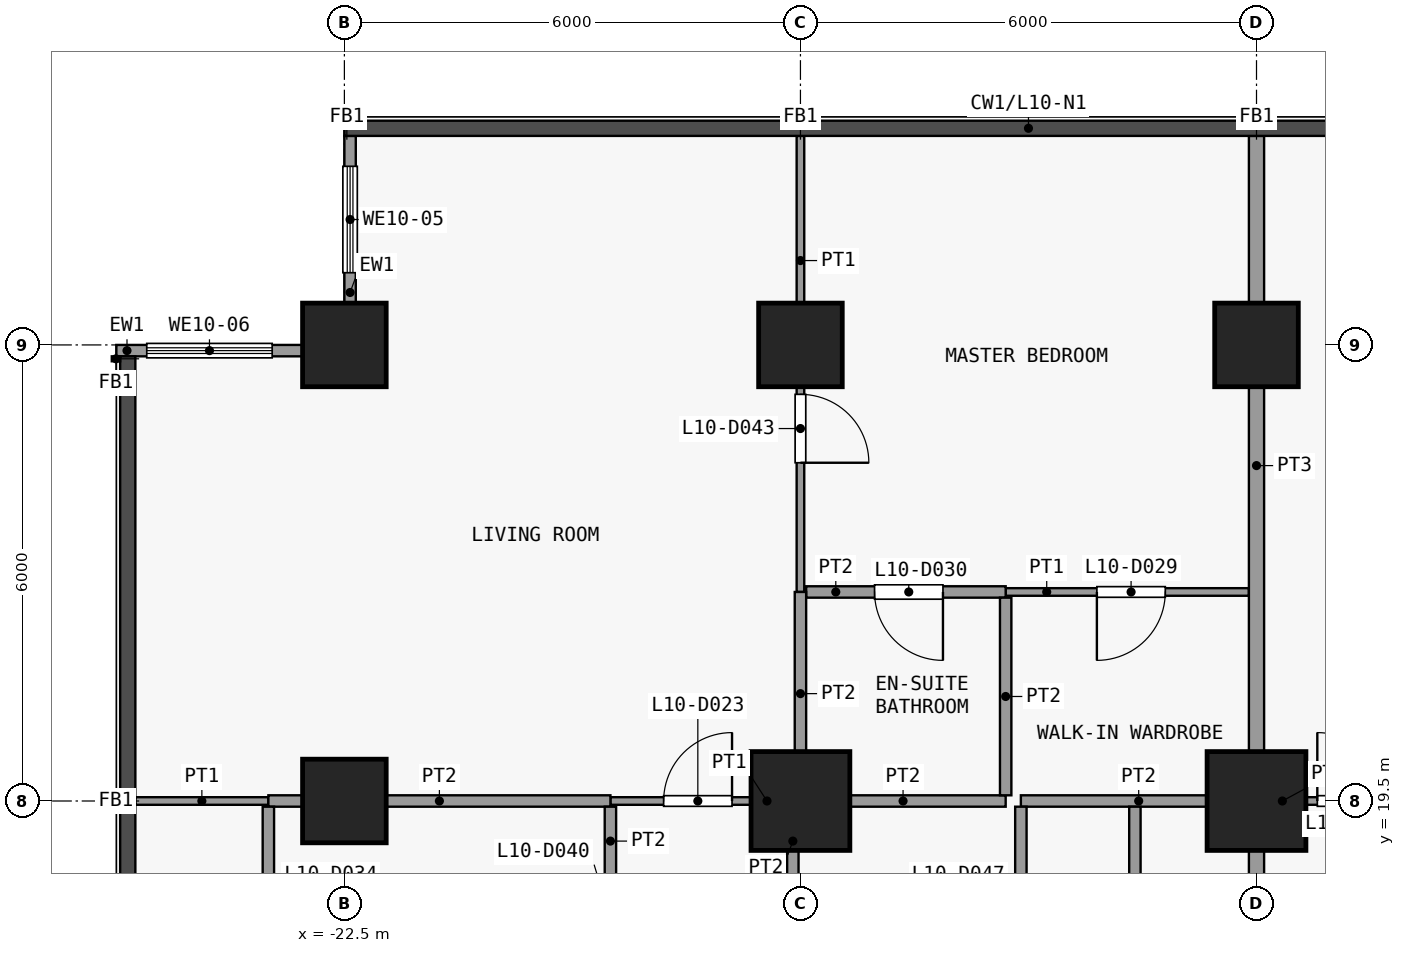
"""IFC4 building model, lengths in metres.
Left out: names, types, materials, properties, quantities, classifications, styles, units other than length and angle.
Written with IfcOpenShell. Run it as: python <this file> out.ifc"""

import sys

from ifc_helpers import new_model, si_unit, direction, frame, frame_2d, origin, origin_2d, place, context, subcontext, project, spatial, rectangle, extrude, element, fill, save


model = new_model("IFC4")
c1 = context("Model", 3, precision=1e-05, world=origin(), true_north=direction((0.0, 1.0)))
c2 = subcontext(c1, "Body", "Model", "MODEL_VIEW")
j1 = project(units=[si_unit("LENGTHUNIT", "METRE"), si_unit("PLANEANGLEUNIT", "RADIAN")], contexts=[c1])
p1 = place(None, origin())
s1 = spatial("IfcSite", under=j1, at=p1, CompositionType="ELEMENT")
p2 = place(p1, origin())
s2 = spatial("IfcBuilding", under=s1, at=p2, CompositionType="ELEMENT")
p3 = place(p2, frame((0.0, 0.0, 46.9)))
s3 = spatial("IfcBuildingStorey", under=s2, at=p3, CompositionType="ELEMENT", Elevation=46.9)
for number, where, z_axis, x_axis in (
    (1, (-22.5, 19.5, 0.0), (0.0, 0.0, 1.0), (1.0, 0.0, 0.0)),
    (2, (-22.5, 25.5, 0.0), (0.0, 0.0, 1.0), (1.0, 0.0, 0.0)),
):
    element("IfcColumn", number, at=place(p3, frame(where, z_axis=z_axis, x_axis=x_axis)), inside=s3, PredefinedType="COLUMN", context=c2, shape_type="SweptSolid", body=[
        extrude(rectangle(XDim=1.1, YDim=1.1, at=origin_2d()), origin(), (0.0, 0.0, 1.0), 3.6),
    ])
p4 = place(p3, frame((-16.5, 19.5, 0.0), z_axis=(0.0, 0.0, 1.0), x_axis=(1.0, 0.0, 0.0)))
e3 = element("IfcColumn", 3, at=p4, inside=s3, PredefinedType="COLUMN", context=c2, shape_type="SweptSolid", body=[
    extrude(rectangle(XDim=1.3, YDim=1.3, at=origin_2d()), origin(), (0.0, 0.0, 1.0), 3.6),
])
p5 = place(p3, frame((-16.5, 25.5, 0.0), z_axis=(0.0, 0.0, 1.0), x_axis=(1.0, 0.0, 0.0)))
e4 = element("IfcColumn", 4, at=p5, inside=s3, PredefinedType="COLUMN", context=c2, shape_type="SweptSolid", body=[
    extrude(rectangle(XDim=1.1, YDim=1.1, at=origin_2d()), origin(), (0.0, 0.0, 1.0), 3.6),
])
p6 = place(p3, frame((-10.5, 19.5, 0.0), z_axis=(0.0, 0.0, 1.0), x_axis=(1.0, 0.0, 0.0)))
e5 = element("IfcColumn", 5, at=p6, inside=s3, PredefinedType="COLUMN", context=c2, shape_type="SweptSolid", body=[
    extrude(rectangle(XDim=1.3, YDim=1.3, at=origin_2d()), origin(), (0.0, 0.0, 1.0), 3.6),
])
p7 = place(p3, frame((-10.5, 25.5, 0.0), z_axis=(0.0, 0.0, 1.0), x_axis=(1.0, 0.0, 0.0)))
e6 = element("IfcColumn", 6, at=p7, inside=s3, PredefinedType="COLUMN", context=c2, shape_type="SweptSolid", body=[
    extrude(rectangle(XDim=1.1, YDim=1.1, at=origin_2d()), origin(), (0.0, 0.0, 1.0), 3.6),
])
p8 = place(p3, frame((-22.425, 26.05, 0.0), z_axis=(0.0, 0.0, 1.0), x_axis=(0.0, 1.0, 0.0)))
e7 = element("IfcWall", 7, at=p8, inside=s3, PredefinedType="SOLIDWALL", context=c2, shape_type="SweptSolid", body=[
    extrude(rectangle(XDim=2.2, YDim=0.15, at=frame_2d((1.1, 0.0))), origin(), (0.0, 0.0, 1.0), 3.3),
])
p9 = place(p8, frame((0.4, 0.0, 0.9)))
e8 = element("IfcOpeningElement", 8, at=p9, cuts=e7, PredefinedType="OPENING", context=c2, shape_type="SweptSolid", body=[
    extrude(rectangle(XDim=1.4, YDim=2.4, at=frame_2d((0.7, 1.2))), frame((0.0, 0.085, 0.0), z_axis=(0.0, -1.0, 0.0), x_axis=(1.0, 0.0, 0.0)), (0.0, 0.0, 1.0), 0.17),
])
p10 = place(p3, frame((-25.5, 25.425, 0.0), z_axis=(0.0, 0.0, 1.0), x_axis=(1.0, 0.0, 0.0)))
e9 = element("IfcWall", 9, at=p10, inside=s3, PredefinedType="SOLIDWALL", context=c2, shape_type="SweptSolid", body=[
    extrude(rectangle(XDim=2.45, YDim=0.15, at=frame_2d((1.225, 0.0))), origin(), (0.0, 0.0, 1.0), 3.3),
])
p11 = place(p10, frame((0.4, 0.0, 0.9)))
e10 = element("IfcOpeningElement", 10, at=p11, cuts=e9, PredefinedType="OPENING", context=c2, shape_type="SweptSolid", body=[
    extrude(rectangle(XDim=1.65, YDim=2.4, at=frame_2d((0.825, 1.2))), frame((0.0, 0.085, 0.0), z_axis=(0.0, -1.0, 0.0), x_axis=(1.0, 0.0, 0.0)), (0.0, 0.0, 1.0), 0.17),
])
p12 = place(p3, frame((-25.25, 19.5, 0.0), z_axis=(0.0, 0.0, 1.0), x_axis=(1.0, 0.0, 0.0)))
e11 = element("IfcWall", 11, at=p12, inside=s3, PredefinedType="PARTITIONING", context=c2, shape_type="SweptSolid", body=[
    extrude(rectangle(XDim=1.75, YDim=0.1, at=frame_2d((0.875, 0.0))), origin(), (0.0, 0.0, 1.0), 3.3),
])
p13 = place(p3, frame((-19.0, 19.5, 0.0), z_axis=(0.0, 0.0, 1.0), x_axis=(1.0, 0.0, 0.0)))
e12 = element("IfcWall", 12, at=p13, inside=s3, PredefinedType="PARTITIONING", context=c2, shape_type="SweptSolid", body=[
    extrude(rectangle(XDim=2.4, YDim=0.1, at=frame_2d((1.2, 0.0))), origin(), (0.0, 0.0, 1.0), 3.3),
])
p14 = place(p13, frame((0.7, 0.0, 0.0)))
e13 = element("IfcOpeningElement", 13, at=p14, cuts=e12, PredefinedType="OPENING", context=c2, shape_type="SweptSolid", body=[
    extrude(rectangle(XDim=0.9, YDim=2.1, at=frame_2d((0.45, 1.05))), frame((0.0, 0.06, 0.0), z_axis=(0.0, -1.0, 0.0), x_axis=(1.0, 0.0, 0.0)), (0.0, 0.0, 1.0), 0.12),
])
p15 = place(p3, frame((-10.5, 19.5, 0.0), z_axis=(0.0, 0.0, 1.0), x_axis=(1.0, 0.0, 0.0)))
e14 = element("IfcWall", 14, at=p15, inside=s3, PredefinedType="PARTITIONING", context=c2, shape_type="SweptSolid", body=[
    extrude(rectangle(XDim=2.4, YDim=0.1, at=frame_2d((1.2, 0.0))), origin(), (0.0, 0.0, 1.0), 3.3),
])
p16 = place(p15, frame((0.8, 0.0, 0.0)))
e15 = element("IfcOpeningElement", 15, at=p16, cuts=e14, PredefinedType="OPENING", context=c2, shape_type="SweptSolid", body=[
    extrude(rectangle(XDim=0.9, YDim=2.1, at=frame_2d((0.45, 1.05))), frame((0.0, 0.06, 0.0), z_axis=(0.0, -1.0, 0.0), x_axis=(1.0, 0.0, 0.0)), (0.0, 0.0, 1.0), 0.12),
])
p17 = place(p3, frame((-23.5, 19.5, 0.0), z_axis=(0.0, 0.0, 1.0), x_axis=(1.0, 0.0, 0.0)))
e16 = element("IfcWall", 16, at=p17, inside=s3, PredefinedType="PARTITIONING", context=c2, shape_type="SweptSolid", body=[
    extrude(rectangle(XDim=4.5, YDim=0.15, at=frame_2d((2.25, 0.0))), origin(), (0.0, 0.0, 1.0), 3.3),
])
p18 = place(p3, frame((-16.5, 19.5, 0.0), z_axis=(0.0, 0.0, 1.0), x_axis=(1.0, 0.0, 0.0)))
e17 = element("IfcWall", 17, at=p18, inside=s3, PredefinedType="PARTITIONING", context=c2, shape_type="SweptSolid", body=[
    extrude(rectangle(XDim=2.7, YDim=0.15, at=frame_2d((1.35, 0.0))), origin(), (0.0, 0.0, 1.0), 3.3),
])
p19 = place(p3, frame((-13.6, 19.5, 0.0), z_axis=(0.0, 0.0, 1.0), x_axis=(1.0, 0.0, 0.0)))
e18 = element("IfcWall", 18, at=p19, inside=s3, PredefinedType="PARTITIONING", context=c2, shape_type="SweptSolid", body=[
    extrude(rectangle(XDim=3.1, YDim=0.15, at=frame_2d((1.55, 0.0))), origin(), (0.0, 0.0, 1.0), 3.3),
])
p20 = place(p3, frame((-13.8, 22.25, 0.0), z_axis=(0.0, 0.0, 1.0), x_axis=(1.0, 0.0, 0.0)))
e19 = element("IfcWall", 19, at=p20, inside=s3, PredefinedType="PARTITIONING", context=c2, shape_type="SweptSolid", body=[
    extrude(rectangle(XDim=3.2, YDim=0.1, at=frame_2d((1.6, 0.0))), origin(), (0.0, 0.0, 1.0), 3.3),
])
p21 = place(p20, frame((1.2, 0.0, 0.0)))
e20 = element("IfcOpeningElement", 20, at=p21, cuts=e19, PredefinedType="OPENING", context=c2, shape_type="SweptSolid", body=[
    extrude(rectangle(XDim=0.9, YDim=2.1, at=frame_2d((0.45, 1.05))), frame((0.0, 0.06, 0.0), z_axis=(0.0, -1.0, 0.0), x_axis=(1.0, 0.0, 0.0)), (0.0, 0.0, 1.0), 0.12),
])
p22 = place(p3, frame((-16.425, 22.25, 0.0), z_axis=(0.0, 0.0, 1.0), x_axis=(1.0, 0.0, 0.0)))
e21 = element("IfcWall", 21, at=p22, inside=s3, PredefinedType="PARTITIONING", context=c2, shape_type="SweptSolid", body=[
    extrude(rectangle(XDim=2.625, YDim=0.15, at=frame_2d((1.312, 0.0))), origin(), (0.0, 0.0, 1.0), 3.3),
])
p23 = place(p22, frame((0.9, 0.0, 0.0)))
e22 = element("IfcOpeningElement", 22, at=p23, cuts=e21, PredefinedType="OPENING", context=c2, shape_type="SweptSolid", body=[
    extrude(rectangle(XDim=0.9, YDim=2.1, at=frame_2d((0.45, 1.05))), frame((0.0, 0.085, 0.0), z_axis=(0.0, -1.0, 0.0), x_axis=(1.0, 0.0, 0.0)), (0.0, 0.0, 1.0), 0.17),
])
p24 = place(p3, frame((-23.5, 16.6, 0.0), z_axis=(0.0, 0.0, 1.0), x_axis=(0.0, 1.0, 0.0)))
e23 = element("IfcWall", 23, at=p24, inside=s3, PredefinedType="PARTITIONING", context=c2, shape_type="SweptSolid", body=[
    extrude(rectangle(XDim=2.825, YDim=0.15, at=frame_2d((1.413, 0.0))), origin(), (0.0, 0.0, 1.0), 3.3),
])
p25 = place(p24, frame((1.0, 0.0, 0.0)))
e24 = element("IfcOpeningElement", 24, at=p25, cuts=e23, PredefinedType="OPENING", context=c2, shape_type="SweptSolid", body=[
    extrude(rectangle(XDim=0.9, YDim=2.1, at=frame_2d((0.45, 1.05))), frame((0.0, 0.085, 0.0), z_axis=(0.0, -1.0, 0.0), x_axis=(1.0, 0.0, 0.0)), (0.0, 0.0, 1.0), 0.17),
])
p26 = place(p3, frame((-19.0, 16.6, 0.0), z_axis=(0.0, 0.0, 1.0), x_axis=(0.0, 1.0, 0.0)))
e25 = element("IfcWall", 25, at=p26, inside=s3, PredefinedType="PARTITIONING", context=c2, shape_type="SweptSolid", body=[
    extrude(rectangle(XDim=2.825, YDim=0.15, at=frame_2d((1.413, 0.0))), origin(), (0.0, 0.0, 1.0), 3.3),
])
p27 = place(p26, frame((0.9, 0.0, 0.0)))
e26 = element("IfcOpeningElement", 26, at=p27, cuts=e25, PredefinedType="OPENING", context=c2, shape_type="SweptSolid", body=[
    extrude(rectangle(XDim=0.9, YDim=2.1, at=frame_2d((0.45, 1.05))), frame((0.0, 0.085, 0.0), z_axis=(0.0, -1.0, 0.0), x_axis=(1.0, 0.0, 0.0)), (0.0, 0.0, 1.0), 0.17),
])
p28 = place(p3, frame((-16.6, 16.6, 0.0), z_axis=(0.0, 0.0, 1.0), x_axis=(0.0, 1.0, 0.0)))
e27 = element("IfcWall", 27, at=p28, inside=s3, PredefinedType="PARTITIONING", context=c2, shape_type="SweptSolid", body=[
    extrude(rectangle(XDim=2.825, YDim=0.15, at=frame_2d((1.413, 0.0))), origin(), (0.0, 0.0, 1.0), 3.3),
])
p29 = place(p28, frame((0.9, 0.0, 0.0)))
e28 = element("IfcOpeningElement", 28, at=p29, cuts=e27, PredefinedType="OPENING", context=c2, shape_type="SweptSolid", body=[
    extrude(rectangle(XDim=0.9, YDim=2.1, at=frame_2d((0.45, 1.05))), frame((0.0, 0.085, 0.0), z_axis=(0.0, -1.0, 0.0), x_axis=(1.0, 0.0, 0.0)), (0.0, 0.0, 1.0), 0.17),
])
p30 = place(p3, frame((-16.5, 22.25, 0.0), z_axis=(0.0, 0.0, 1.0), x_axis=(0.0, 1.0, 0.0)))
e29 = element("IfcWall", 29, at=p30, inside=s3, PredefinedType="PARTITIONING", context=c2, shape_type="SweptSolid", body=[
    extrude(rectangle(XDim=6.0, YDim=0.1, at=frame_2d((3.0, 0.0))), origin(), (0.0, 0.0, 1.0), 3.3),
])
p31 = place(p30, frame((1.7, 0.0, 0.0)))
e30 = element("IfcOpeningElement", 30, at=p31, cuts=e29, PredefinedType="OPENING", context=c2, shape_type="SweptSolid", body=[
    extrude(rectangle(XDim=0.9, YDim=2.1, at=frame_2d((0.45, 1.05))), frame((0.0, 0.06, 0.0), z_axis=(0.0, -1.0, 0.0), x_axis=(1.0, 0.0, 0.0)), (0.0, 0.0, 1.0), 0.12),
])
p32 = place(p3, frame((-16.5, 19.575, 0.0), z_axis=(0.0, 0.0, 1.0), x_axis=(0.0, 1.0, 0.0)))
e31 = element("IfcWall", 31, at=p32, inside=s3, PredefinedType="PARTITIONING", context=c2, shape_type="SweptSolid", body=[
    extrude(rectangle(XDim=2.675, YDim=0.15, at=frame_2d((1.337, 0.0))), origin(), (0.0, 0.0, 1.0), 3.3),
])
p33 = place(p3, frame((-13.8, 19.575, 0.0), z_axis=(0.0, 0.0, 1.0), x_axis=(0.0, 1.0, 0.0)))
e32 = element("IfcWall", 32, at=p33, inside=s3, PredefinedType="PARTITIONING", context=c2, shape_type="SweptSolid", body=[
    extrude(rectangle(XDim=2.6, YDim=0.15, at=frame_2d((1.3, 0.0))), origin(), (0.0, 0.0, 1.0), 3.3),
])
p34 = place(p3, frame((-13.6, 16.6, 0.0), z_axis=(0.0, 0.0, 1.0), x_axis=(0.0, 1.0, 0.0)))
e33 = element("IfcWall", 33, at=p34, inside=s3, PredefinedType="PARTITIONING", context=c2, shape_type="SweptSolid", body=[
    extrude(rectangle(XDim=2.825, YDim=0.15, at=frame_2d((1.413, 0.0))), origin(), (0.0, 0.0, 1.0), 3.3),
])
p35 = place(p34, frame((1.0, 0.0, 0.0)))
e34 = element("IfcOpeningElement", 34, at=p35, cuts=e33, PredefinedType="OPENING", context=c2, shape_type="SweptSolid", body=[
    extrude(rectangle(XDim=0.9, YDim=2.1, at=frame_2d((0.45, 1.05))), frame((0.0, 0.085, 0.0), z_axis=(0.0, -1.0, 0.0), x_axis=(1.0, 0.0, 0.0)), (0.0, 0.0, 1.0), 0.17),
])
p36 = place(p3, frame((-12.1, 16.6, 0.0), z_axis=(0.0, 0.0, 1.0), x_axis=(0.0, 1.0, 0.0)))
e35 = element("IfcWall", 35, at=p36, inside=s3, PredefinedType="PARTITIONING", context=c2, shape_type="SweptSolid", body=[
    extrude(rectangle(XDim=2.825, YDim=0.15, at=frame_2d((1.413, 0.0))), origin(), (0.0, 0.0, 1.0), 3.3),
])
p37 = place(p36, frame((1.0, 0.0, 0.0)))
e36 = element("IfcOpeningElement", 36, at=p37, cuts=e35, PredefinedType="OPENING", context=c2, shape_type="SweptSolid", body=[
    extrude(rectangle(XDim=0.9, YDim=2.1, at=frame_2d((0.45, 1.05))), frame((0.0, 0.085, 0.0), z_axis=(0.0, -1.0, 0.0), x_axis=(1.0, 0.0, 0.0)), (0.0, 0.0, 1.0), 0.17),
])
p38 = place(p3, frame((-10.5, 16.6, 0.0), z_axis=(0.0, 0.0, 1.0), x_axis=(0.0, 1.0, 0.0)))
e37 = element("IfcWall", 37, at=p38, inside=s3, PredefinedType="PARTITIONING", context=c2, shape_type="SweptSolid", body=[
    extrude(rectangle(XDim=2.825, YDim=0.2, at=frame_2d((1.413, 0.0))), origin(), (0.0, 0.0, 1.0), 3.3),
])
p39 = place(p3, frame((-10.5, 19.575, 0.0), z_axis=(0.0, 0.0, 1.0), x_axis=(0.0, 1.0, 0.0)))
e38 = element("IfcWall", 38, at=p39, inside=s3, PredefinedType="PARTITIONING", context=c2, shape_type="SweptSolid", body=[
    extrude(rectangle(XDim=8.675, YDim=0.2, at=frame_2d((4.337, 0.0))), origin(), (0.0, 0.0, 1.0), 3.3),
])
p40 = place(p9, origin())
e39 = element("IfcWindow", 39, at=p40, inside=s3, PartitioningType="SINGLE_PANEL", PredefinedType="WINDOW", context=c2, shape_type="SweptSolid", body=[
    extrude(rectangle(XDim=1.4, YDim=2.4, at=frame_2d((0.7, 1.2))), frame((0.0, 0.03, 0.0), z_axis=(0.0, -1.0, 0.0), x_axis=(1.0, 0.0, 0.0)), (0.0, 0.0, 1.0), 0.06),
])
fill(e8, e39)
p41 = place(p11, origin())
e40 = element("IfcWindow", 40, at=p41, inside=s3, PartitioningType="SINGLE_PANEL", PredefinedType="WINDOW", context=c2, shape_type="SweptSolid", body=[
    extrude(rectangle(XDim=1.65, YDim=2.4, at=frame_2d((0.825, 1.2))), frame((0.0, 0.03, 0.0), z_axis=(0.0, -1.0, 0.0), x_axis=(1.0, 0.0, 0.0)), (0.0, 0.0, 1.0), 0.06),
])
fill(e10, e40)
p42 = place(p14, origin())
e41 = element("IfcDoor", 41, at=p42, inside=s3, OperationType="SINGLE_SWING_LEFT", PredefinedType="DOOR", context=c2, shape_type="SweptSolid", body=[
    extrude(rectangle(XDim=0.9, YDim=2.1, at=frame_2d((0.45, 1.05))), frame((0.0, 0.025, 0.0), z_axis=(0.0, -1.0, 0.0), x_axis=(1.0, 0.0, 0.0)), (0.0, 0.0, 1.0), 0.05),
])
fill(e13, e41)
p43 = place(p16, origin())
e42 = element("IfcDoor", 42, at=p43, inside=s3, OperationType="SINGLE_SWING_RIGHT", PredefinedType="DOOR", context=c2, shape_type="SweptSolid", body=[
    extrude(rectangle(XDim=0.9, YDim=2.1, at=frame_2d((0.45, 1.05))), frame((0.0, 0.025, 0.0), z_axis=(0.0, -1.0, 0.0), x_axis=(1.0, 0.0, 0.0)), (0.0, 0.0, 1.0), 0.05),
])
fill(e15, e42)
p44 = place(p21, origin())
e43 = element("IfcDoor", 43, at=p44, inside=s3, OperationType="SINGLE_SWING_LEFT", PredefinedType="DOOR", context=c2, shape_type="SweptSolid", body=[
    extrude(rectangle(XDim=0.9, YDim=2.1, at=frame_2d((0.45, 1.05))), frame((0.0, 0.025, 0.0), z_axis=(0.0, -1.0, 0.0), x_axis=(1.0, 0.0, 0.0)), (0.0, 0.0, 1.0), 0.05),
])
fill(e20, e43)
p45 = place(p23, origin())
e44 = element("IfcDoor", 44, at=p45, inside=s3, OperationType="SINGLE_SWING_RIGHT", PredefinedType="DOOR", context=c2, shape_type="SweptSolid", body=[
    extrude(rectangle(XDim=0.9, YDim=2.1, at=frame_2d((0.45, 1.05))), frame((0.0, 0.025, 0.0), z_axis=(0.0, -1.0, 0.0), x_axis=(1.0, 0.0, 0.0)), (0.0, 0.0, 1.0), 0.05),
])
fill(e22, e44)
p46 = place(p31, origin())
e45 = element("IfcDoor", 45, at=p46, inside=s3, OperationType="SINGLE_SWING_LEFT", PredefinedType="DOOR", context=c2, shape_type="SweptSolid", body=[
    extrude(rectangle(XDim=0.9, YDim=2.1, at=frame_2d((0.45, 1.05))), frame((0.0, 0.025, 0.0), z_axis=(0.0, -1.0, 0.0), x_axis=(1.0, 0.0, 0.0)), (0.0, 0.0, 1.0), 0.05),
])
fill(e30, e45)
save(model, sys.argv[1])
